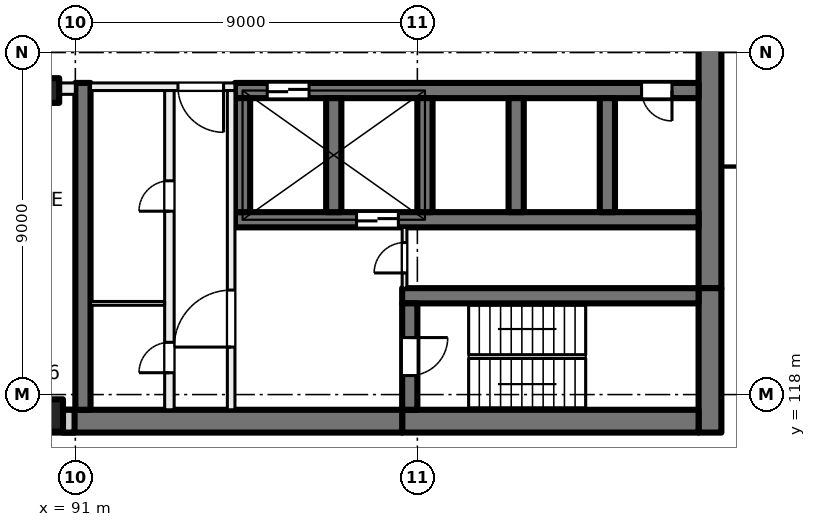
"""IFC4 building model, lengths in metres.
Left out: names, types, materials, properties, quantities, classifications, styles, units other than length and angle.
Written with IfcOpenShell. Run it as: python <this file> out.ifc"""

import sys

from ifc_helpers import new_model, si_unit, direction, frame, frame_2d, origin, origin_2d, place, context, subcontext, project, spatial, rectangle, extrude, element, fill, save


model = new_model("IFC4")
c1 = context("Model", 3, precision=1e-05, world=origin(), true_north=direction((0.0, 1.0)))
c2 = subcontext(c1, "Body", "Model", "MODEL_VIEW")
j1 = project(units=[si_unit("LENGTHUNIT", "METRE"), si_unit("PLANEANGLEUNIT", "RADIAN")], contexts=[c1])
p1 = place(None, origin())
s1 = spatial("IfcSite", under=j1, at=p1, CompositionType="ELEMENT")
p2 = place(p1, origin())
s2 = spatial("IfcBuilding", under=s1, at=p2, CompositionType="ELEMENT")
p3 = place(p2, frame((0.0, 0.0, 121.0)))
s3 = spatial("IfcBuildingStorey", under=s2, at=p3, CompositionType="ELEMENT", Elevation=121.0)
p4 = place(p3, frame((90.25, 126.0, 0.0), z_axis=(0.0, 0.0, 1.0), x_axis=(1.0, 0.0, 0.0)))
e1 = element("IfcColumn", 1, at=p4, inside=s3, PredefinedType="COLUMN", context=c2, shape_type="SweptSolid", body=[
    extrude(rectangle(XDim=0.65, YDim=0.65, at=origin_2d()), origin(), (0.0, 0.0, 1.0), 4.0),
])
p5 = place(p3, frame((90.25, 117.45, 0.0), z_axis=(0.0, 0.0, 1.0), x_axis=(1.0, 0.0, 0.0)))
e2 = element("IfcColumn", 2, at=p5, inside=s3, PredefinedType="COLUMN", context=c2, shape_type="SweptSolid", body=[
    extrude(rectangle(XDim=0.85, YDim=0.85, at=origin_2d()), origin(), (0.0, 0.0, 1.0), 4.0),
])
p6 = place(p3, frame((107.7, 135.2, 0.0), z_axis=(0.0, 0.0, 1.0), x_axis=(0.0, -1.0, 0.0)))
e3 = element("IfcWall", 3, at=p6, inside=s3, PredefinedType="SHEAR", context=c2, shape_type="SweptSolid", body=[
    extrude(rectangle(XDim=14.4, YDim=0.6, at=frame_2d((7.2, 0.0))), origin(), (0.0, 0.0, 1.0), 4.0),
])
p7 = place(p3, frame((107.7, 120.8, 0.0), z_axis=(0.0, 0.0, 1.0), x_axis=(0.0, -1.0, 0.0)))
e4 = element("IfcWall", 4, at=p7, inside=s3, PredefinedType="SHEAR", context=c2, shape_type="SweptSolid", body=[
    extrude(rectangle(XDim=3.8, YDim=0.6, at=frame_2d((1.9, 0.0))), origin(), (0.0, 0.0, 1.0), 4.0),
])
p8 = place(p3, frame((107.4, 117.3, 0.0), z_axis=(0.0, 0.0, 1.0), x_axis=(-1.0, 0.0, 0.0)))
e5 = element("IfcWall", 5, at=p8, inside=s3, PredefinedType="SHEAR", context=c2, shape_type="SweptSolid", body=[
    extrude(rectangle(XDim=7.8, YDim=0.6, at=frame_2d((3.9, 0.0))), origin(), (0.0, 0.0, 1.0), 4.0),
])
p9 = place(p3, frame((99.6, 117.3, 0.0), z_axis=(0.0, 0.0, 1.0), x_axis=(-1.0, 0.0, 0.0)))
e6 = element("IfcWall", 6, at=p9, inside=s3, PredefinedType="SHEAR", context=c2, shape_type="SweptSolid", body=[
    extrude(rectangle(XDim=8.925, YDim=0.6, at=frame_2d((4.462, 0.0))), origin(), (0.0, 0.0, 1.0), 4.0),
])
p10 = place(p3, frame((107.4, 120.6, 0.0), z_axis=(0.0, 0.0, 1.0), x_axis=(-1.0, 0.0, 0.0)))
e7 = element("IfcWall", 7, at=p10, inside=s3, PredefinedType="SHEAR", context=c2, shape_type="SweptSolid", body=[
    extrude(rectangle(XDim=7.8, YDim=0.4, at=frame_2d((3.9, 0.0))), origin(), (0.0, 0.0, 1.0), 4.0),
])
p11 = place(p3, frame((99.8, 120.4, 0.0), z_axis=(0.0, 0.0, 1.0), x_axis=(0.0, -1.0, 0.0)))
e8 = element("IfcWall", 8, at=p11, inside=s3, PredefinedType="SHEAR", context=c2, shape_type="SweptSolid", body=[
    extrude(rectangle(XDim=2.8, YDim=0.4, at=frame_2d((1.4, 0.0))), origin(), (0.0, 0.0, 1.0), 4.0),
])
p12 = place(p11, frame((0.9, 0.0, 0.0)))
e9 = element("IfcOpeningElement", 9, at=p12, cuts=e8, PredefinedType="OPENING", context=c2, shape_type="SweptSolid", body=[
    extrude(rectangle(XDim=1.0, YDim=2.1, at=frame_2d((0.5, 1.05))), frame((0.0, 0.21, 0.0), z_axis=(0.0, -1.0, 0.0), x_axis=(1.0, 0.0, 0.0)), (0.0, 0.0, 1.0), 0.42),
])
p13 = place(p3, frame((107.4, 126.0, 0.0), z_axis=(0.0, 0.0, 1.0), x_axis=(-1.0, 0.0, 0.0)))
e10 = element("IfcWall", 10, at=p13, inside=s3, PredefinedType="SHEAR", context=c2, shape_type="SweptSolid", body=[
    extrude(rectangle(XDim=12.2, YDim=0.4, at=frame_2d((6.1, 0.0))), origin(), (0.0, 0.0, 1.0), 4.0),
])
p14 = place(p13, frame((10.25, 0.0, 0.0)))
e11 = element("IfcOpeningElement", 11, at=p14, cuts=e10, PredefinedType="OPENING", context=c2, shape_type="SweptSolid", body=[
    extrude(rectangle(XDim=1.1, YDim=2.1, at=frame_2d((0.55, 1.05))), frame((0.0, 0.21, 0.0), z_axis=(0.0, -1.0, 0.0), x_axis=(1.0, 0.0, 0.0)), (0.0, 0.0, 1.0), 0.42),
])
p15 = place(p13, frame((0.7, 0.0, 0.0)))
e12 = element("IfcOpeningElement", 12, at=p15, cuts=e10, PredefinedType="OPENING", context=c2, shape_type="SweptSolid", body=[
    extrude(rectangle(XDim=0.8, YDim=2.1, at=frame_2d((0.4, 1.05))), frame((0.0, 0.21, 0.0), z_axis=(0.0, -1.0, 0.0), x_axis=(1.0, 0.0, 0.0)), (0.0, 0.0, 1.0), 0.42),
])
p16 = place(p3, frame((107.4, 122.6, 0.0), z_axis=(0.0, 0.0, 1.0), x_axis=(-1.0, 0.0, 0.0)))
e13 = element("IfcWall", 13, at=p16, inside=s3, PredefinedType="SHEAR", context=c2, shape_type="SweptSolid", body=[
    extrude(rectangle(XDim=12.2, YDim=0.4, at=frame_2d((6.1, 0.0))), origin(), (0.0, 0.0, 1.0), 4.0),
])
p17 = place(p16, frame((7.9, 0.0, 0.0)))
e14 = element("IfcOpeningElement", 14, at=p17, cuts=e13, PredefinedType="OPENING", context=c2, shape_type="SweptSolid", body=[
    extrude(rectangle(XDim=1.1, YDim=2.1, at=frame_2d((0.55, 1.05))), frame((0.0, 0.21, 0.0), z_axis=(0.0, -1.0, 0.0), x_axis=(1.0, 0.0, 0.0)), (0.0, 0.0, 1.0), 0.42),
])
for number, where, z_axis, x_axis in (
    (15, (105.0, 125.8, 0.0), (0.0, 0.0, 1.0), (0.0, -1.0, 0.0)),
    (16, (102.6, 125.8, 0.0), (0.0, 0.0, 1.0), (0.0, -1.0, 0.0)),
    (17, (100.2, 125.8, 0.0), (0.0, 0.0, 1.0), (0.0, -1.0, 0.0)),
    (18, (97.8, 125.8, 0.0), (0.0, 0.0, 1.0), (0.0, -1.0, 0.0)),
    (19, (95.4, 125.8, 0.0), (0.0, 0.0, 1.0), (0.0, -1.0, 0.0)),
):
    element("IfcWall", number, at=place(p3, frame(where, z_axis=z_axis, x_axis=x_axis)), inside=s3, PredefinedType="SHEAR", context=c2, shape_type="SweptSolid", body=[
        extrude(rectangle(XDim=3.0, YDim=0.4, at=frame_2d((1.5, 0.0))), origin(), (0.0, 0.0, 1.0), 4.0),
    ])
p18 = place(p3, frame((91.2, 126.2, 0.0), z_axis=(0.0, 0.0, 1.0), x_axis=(0.0, -1.0, 0.0)))
e20 = element("IfcWall", 20, at=p18, inside=s3, PredefinedType="SHEAR", context=c2, shape_type="SweptSolid", body=[
    extrude(rectangle(XDim=8.6, YDim=0.4, at=frame_2d((4.3, 0.0))), origin(), (0.0, 0.0, 1.0), 4.0),
])
p19 = place(p3, frame((90.98, 117.3, 0.0), z_axis=(0.0, 0.0, 1.0), x_axis=(-1.0, 0.0, 0.0)))
e21 = element("IfcWall", 21, at=p19, inside=s3, PredefinedType="SOLIDWALL", context=c2, shape_type="SweptSolid", body=[
    extrude(rectangle(XDim=33.745, YDim=0.6, at=frame_2d((16.873, 0.0))), origin(), (0.0, 0.0, 1.0), 3.625),
])
p20 = place(p19, frame((1.48, 0.0, 0.9)))
e22 = element("IfcOpeningElement", 22, at=p20, cuts=e21, PredefinedType="OPENING", context=c2, shape_type="SweptSolid", body=[
    extrude(rectangle(XDim=3.0, YDim=2.4, at=frame_2d((1.5, 1.2))), frame((0.0, 0.31, 0.0), z_axis=(0.0, -1.0, 0.0), x_axis=(1.0, 0.0, 0.0)), (0.0, 0.0, 1.0), 0.62),
])
p21 = place(p19, frame((5.98, 0.0, 0.9)))
e23 = element("IfcOpeningElement", 23, at=p21, cuts=e21, PredefinedType="OPENING", context=c2, shape_type="SweptSolid", body=[
    extrude(rectangle(XDim=3.0, YDim=2.4, at=frame_2d((1.5, 1.2))), frame((0.0, 0.31, 0.0), z_axis=(0.0, -1.0, 0.0), x_axis=(1.0, 0.0, 0.0)), (0.0, 0.0, 1.0), 0.62),
])
p22 = place(p19, frame((10.48, 0.0, 0.9)))
e24 = element("IfcOpeningElement", 24, at=p22, cuts=e21, PredefinedType="OPENING", context=c2, shape_type="SweptSolid", body=[
    extrude(rectangle(XDim=3.0, YDim=2.4, at=frame_2d((1.5, 1.2))), frame((0.0, 0.31, 0.0), z_axis=(0.0, -1.0, 0.0), x_axis=(1.0, 0.0, 0.0)), (0.0, 0.0, 1.0), 0.62),
])
p23 = place(p19, frame((14.98, 0.0, 0.9)))
e25 = element("IfcOpeningElement", 25, at=p23, cuts=e21, PredefinedType="OPENING", context=c2, shape_type="SweptSolid", body=[
    extrude(rectangle(XDim=3.0, YDim=2.4, at=frame_2d((1.5, 1.2))), frame((0.0, 0.31, 0.0), z_axis=(0.0, -1.0, 0.0), x_axis=(1.0, 0.0, 0.0)), (0.0, 0.0, 1.0), 0.62),
])
p24 = place(p19, frame((19.48, 0.0, 0.9)))
e26 = element("IfcOpeningElement", 26, at=p24, cuts=e21, PredefinedType="OPENING", context=c2, shape_type="SweptSolid", body=[
    extrude(rectangle(XDim=3.0, YDim=2.4, at=frame_2d((1.5, 1.2))), frame((0.0, 0.31, 0.0), z_axis=(0.0, -1.0, 0.0), x_axis=(1.0, 0.0, 0.0)), (0.0, 0.0, 1.0), 0.62),
])
p25 = place(p19, frame((23.98, 0.0, 0.9)))
e27 = element("IfcOpeningElement", 27, at=p25, cuts=e21, PredefinedType="OPENING", context=c2, shape_type="SweptSolid", body=[
    extrude(rectangle(XDim=3.0, YDim=2.4, at=frame_2d((1.5, 1.2))), frame((0.0, 0.31, 0.0), z_axis=(0.0, -1.0, 0.0), x_axis=(1.0, 0.0, 0.0)), (0.0, 0.0, 1.0), 0.62),
])
p26 = place(p19, frame((28.48, 0.0, 0.9)))
e28 = element("IfcOpeningElement", 28, at=p26, cuts=e21, PredefinedType="OPENING", context=c2, shape_type="SweptSolid", body=[
    extrude(rectangle(XDim=3.0, YDim=2.4, at=frame_2d((1.5, 1.2))), frame((0.0, 0.31, 0.0), z_axis=(0.0, -1.0, 0.0), x_axis=(1.0, 0.0, 0.0)), (0.0, 0.0, 1.0), 0.62),
])
p27 = place(p3, frame((95.2, 126.1, 0.0), z_axis=(0.0, 0.0, 1.0), x_axis=(-1.0, 0.0, 0.0)))
e29 = element("IfcWall", 29, at=p27, inside=s3, PredefinedType="PARTITIONING", context=c2, shape_type="SweptSolid", body=[
    extrude(rectangle(XDim=3.8, YDim=0.2, at=frame_2d((1.9, 0.0))), origin(), (0.0, 0.0, 1.0), 3.625),
])
p28 = place(p27, frame((0.3, 0.0, 0.0)))
e30 = element("IfcOpeningElement", 30, at=p28, cuts=e29, PredefinedType="OPENING", context=c2, shape_type="SweptSolid", body=[
    extrude(rectangle(XDim=1.2, YDim=2.1, at=frame_2d((0.6, 1.05))), frame((0.0, 0.11, 0.0), z_axis=(0.0, -1.0, 0.0), x_axis=(1.0, 0.0, 0.0)), (0.0, 0.0, 1.0), 0.22),
])
p29 = place(p3, frame((95.1, 117.6, 0.0), z_axis=(0.0, 0.0, 1.0), x_axis=(0.0, 1.0, 0.0)))
e31 = element("IfcWall", 31, at=p29, inside=s3, PredefinedType="PARTITIONING", context=c2, shape_type="SweptSolid", body=[
    extrude(rectangle(XDim=8.4, YDim=0.2, at=frame_2d((4.2, 0.0))), origin(), (0.0, 0.0, 1.0), 3.625),
])
p30 = place(p29, frame((1.65, 0.0, 0.0)))
e32 = element("IfcOpeningElement", 32, at=p30, cuts=e31, PredefinedType="OPENING", context=c2, shape_type="SweptSolid", body=[
    extrude(rectangle(XDim=1.5, YDim=2.1, at=frame_2d((0.75, 1.05))), frame((0.0, 0.11, 0.0), z_axis=(0.0, -1.0, 0.0), x_axis=(1.0, 0.0, 0.0)), (0.0, 0.0, 1.0), 0.22),
])
p31 = place(p3, frame((93.475, 117.6, 0.0), z_axis=(0.0, 0.0, 1.0), x_axis=(0.0, 1.0, 0.0)))
e33 = element("IfcWall", 33, at=p31, inside=s3, PredefinedType="PARTITIONING", context=c2, shape_type="SweptSolid", body=[
    extrude(rectangle(XDim=8.4, YDim=0.25, at=frame_2d((4.2, 0.0))), origin(), (0.0, 0.0, 1.0), 3.625),
])
p32 = place(p31, frame((5.225, 0.0, 0.0)))
e34 = element("IfcOpeningElement", 34, at=p32, cuts=e33, PredefinedType="OPENING", context=c2, shape_type="SweptSolid", body=[
    extrude(rectangle(XDim=0.8, YDim=2.1, at=frame_2d((0.4, 1.05))), frame((0.0, 0.135, 0.0), z_axis=(0.0, -1.0, 0.0), x_axis=(1.0, 0.0, 0.0)), (0.0, 0.0, 1.0), 0.27),
])
p33 = place(p31, frame((0.975, 0.0, 0.0)))
e35 = element("IfcOpeningElement", 35, at=p33, cuts=e33, PredefinedType="OPENING", context=c2, shape_type="SweptSolid", body=[
    extrude(rectangle(XDim=0.8, YDim=2.1, at=frame_2d((0.4, 1.05))), frame((0.0, 0.135, 0.0), z_axis=(0.0, -1.0, 0.0), x_axis=(1.0, 0.0, 0.0)), (0.0, 0.0, 1.0), 0.27),
])
p34 = place(p3, frame((99.663, 120.8, 0.0), z_axis=(0.0, 0.0, 1.0), x_axis=(0.0, 1.0, 0.0)))
e36 = element("IfcWall", 36, at=p34, inside=s3, PredefinedType="PARTITIONING", context=c2, shape_type="SweptSolid", body=[
    extrude(rectangle(XDim=1.6, YDim=0.125, at=frame_2d((0.8, 0.0))), origin(), (0.0, 0.0, 1.0), 3.625),
])
p35 = place(p34, frame((0.4, 0.0, 0.0)))
e37 = element("IfcOpeningElement", 37, at=p35, cuts=e36, PredefinedType="OPENING", context=c2, shape_type="SweptSolid", body=[
    extrude(rectangle(XDim=0.8, YDim=2.1, at=frame_2d((0.4, 1.05))), frame((0.0, 0.073, 0.0), z_axis=(0.0, -1.0, 0.0), x_axis=(1.0, 0.0, 0.0)), (0.0, 0.0, 1.0), 0.145),
])
p36 = place(p3, frame((93.35, 120.4, 0.0), z_axis=(0.0, 0.0, 1.0), x_axis=(-1.0, 0.0, 0.0)))
e38 = element("IfcWall", 38, at=p36, inside=s3, PredefinedType="PARTITIONING", context=c2, shape_type="SweptSolid", body=[
    extrude(rectangle(XDim=1.95, YDim=0.1, at=frame_2d((0.975, 0.0))), origin(), (0.0, 0.0, 1.0), 3.625),
])
p37 = place(p3, frame((91.0, 126.05, 0.0), z_axis=(0.0, 0.0, 1.0), x_axis=(-1.0, 0.0, 0.0)))
e39 = element("IfcWall", 39, at=p37, inside=s3, PredefinedType="PARTITIONING", context=c2, shape_type="SweptSolid", body=[
    extrude(rectangle(XDim=43.785, YDim=0.3, at=frame_2d((21.893, 0.0))), origin(), (0.0, 0.0, 1.0), 3.625),
])
p38 = place(p37, frame((7.475, 0.0, 0.0)))
e40 = element("IfcOpeningElement", 40, at=p38, cuts=e39, PredefinedType="OPENING", context=c2, shape_type="SweptSolid", body=[
    extrude(rectangle(XDim=1.8, YDim=2.1, at=frame_2d((0.9, 1.05))), frame((0.0, 0.16, 0.0), z_axis=(0.0, -1.0, 0.0), x_axis=(1.0, 0.0, 0.0)), (0.0, 0.0, 1.0), 0.32),
])
p39 = place(p37, frame((34.0, 0.0, 0.0)))
e41 = element("IfcOpeningElement", 41, at=p39, cuts=e39, PredefinedType="OPENING", context=c2, shape_type="SweptSolid", body=[
    extrude(rectangle(XDim=1.0, YDim=2.1, at=frame_2d((0.5, 1.05))), frame((0.0, 0.16, 0.0), z_axis=(0.0, -1.0, 0.0), x_axis=(1.0, 0.0, 0.0)), (0.0, 0.0, 1.0), 0.32),
])
p40 = place(p37, frame((39.296, 0.0, 0.0)))
e42 = element("IfcOpeningElement", 42, at=p40, cuts=e39, PredefinedType="OPENING", context=c2, shape_type="SweptSolid", body=[
    extrude(rectangle(XDim=1.8, YDim=2.1, at=frame_2d((0.9, 1.05))), frame((0.0, 0.16, 0.0), z_axis=(0.0, -1.0, 0.0), x_axis=(1.0, 0.0, 0.0)), (0.0, 0.0, 1.0), 0.32),
])
p41 = place(p14, origin())
e43 = element("IfcDoor", 43, at=p41, inside=s3, OperationType="DOUBLE_DOOR_SLIDING", PredefinedType="DOOR", context=c2, shape_type="SweptSolid", body=[
    extrude(rectangle(XDim=1.1, YDim=2.1, at=frame_2d((0.55, 1.05))), frame((0.0, 0.025, 0.0), z_axis=(0.0, -1.0, 0.0), x_axis=(1.0, 0.0, 0.0)), (0.0, 0.0, 1.0), 0.05),
])
fill(e11, e43)
p42 = place(p15, origin())
e44 = element("IfcDoor", 44, at=p42, inside=s3, OperationType="SINGLE_SWING_LEFT", PredefinedType="DOOR", context=c2, shape_type="SweptSolid", body=[
    extrude(rectangle(XDim=0.8, YDim=2.1, at=frame_2d((0.4, 1.05))), frame((0.0, 0.025, 0.0), z_axis=(0.0, -1.0, 0.0), x_axis=(1.0, 0.0, 0.0)), (0.0, 0.0, 1.0), 0.05),
])
fill(e12, e44)
p43 = place(p28, origin())
e45 = element("IfcDoor", 45, at=p43, inside=s3, OperationType="DOUBLE_DOOR_SINGLE_SWING", PredefinedType="DOOR", context=c2, shape_type="SweptSolid", body=[
    extrude(rectangle(XDim=1.2, YDim=2.1, at=frame_2d((0.6, 1.05))), frame((0.0, 0.025, 0.0), z_axis=(0.0, -1.0, 0.0), x_axis=(1.0, 0.0, 0.0)), (0.0, 0.0, 1.0), 0.05),
])
fill(e30, e45)
p44 = place(p30, origin())
e46 = element("IfcDoor", 46, at=p44, inside=s3, OperationType="DOUBLE_DOOR_SINGLE_SWING", PredefinedType="DOOR", context=c2, shape_type="SweptSolid", body=[
    extrude(rectangle(XDim=1.5, YDim=2.1, at=frame_2d((0.75, 1.05))), frame((0.0, 0.025, 0.0), z_axis=(0.0, -1.0, 0.0), x_axis=(1.0, 0.0, 0.0)), (0.0, 0.0, 1.0), 0.05),
])
fill(e32, e46)
p45 = place(p12, origin())
e47 = element("IfcDoor", 47, at=p45, inside=s3, OperationType="SINGLE_SWING_LEFT", PredefinedType="DOOR", context=c2, shape_type="SweptSolid", body=[
    extrude(rectangle(XDim=1.0, YDim=2.1, at=frame_2d((0.5, 1.05))), frame((0.0, 0.025, 0.0), z_axis=(0.0, -1.0, 0.0), x_axis=(1.0, 0.0, 0.0)), (0.0, 0.0, 1.0), 0.05),
])
fill(e9, e47)
p46 = place(p35, origin())
e48 = element("IfcDoor", 48, at=p46, inside=s3, OperationType="SINGLE_SWING_RIGHT", PredefinedType="DOOR", context=c2, shape_type="SweptSolid", body=[
    extrude(rectangle(XDim=0.8, YDim=2.1, at=frame_2d((0.4, 1.05))), frame((0.0, 0.025, 0.0), z_axis=(0.0, -1.0, 0.0), x_axis=(1.0, 0.0, 0.0)), (0.0, 0.0, 1.0), 0.05),
])
fill(e37, e48)
p47 = place(p32, origin())
e49 = element("IfcDoor", 49, at=p47, inside=s3, OperationType="SINGLE_SWING_LEFT", PredefinedType="DOOR", context=c2, shape_type="SweptSolid", body=[
    extrude(rectangle(XDim=0.8, YDim=2.1, at=frame_2d((0.4, 1.05))), frame((0.0, 0.025, 0.0), z_axis=(0.0, -1.0, 0.0), x_axis=(1.0, 0.0, 0.0)), (0.0, 0.0, 1.0), 0.05),
])
fill(e34, e49)
p48 = place(p33, origin())
e50 = element("IfcDoor", 50, at=p48, inside=s3, OperationType="SINGLE_SWING_RIGHT", PredefinedType="DOOR", context=c2, shape_type="SweptSolid", body=[
    extrude(rectangle(XDim=0.8, YDim=2.1, at=frame_2d((0.4, 1.05))), frame((0.0, 0.025, 0.0), z_axis=(0.0, -1.0, 0.0), x_axis=(1.0, 0.0, 0.0)), (0.0, 0.0, 1.0), 0.05),
])
fill(e35, e50)
p49 = place(p17, origin())
e51 = element("IfcDoor", 51, at=p49, inside=s3, OperationType="DOUBLE_DOOR_SLIDING", PredefinedType="DOOR", context=c2, shape_type="SweptSolid", body=[
    extrude(rectangle(XDim=1.1, YDim=2.1, at=frame_2d((0.55, 1.05))), frame((0.0, 0.025, 0.0), z_axis=(0.0, -1.0, 0.0), x_axis=(1.0, 0.0, 0.0)), (0.0, 0.0, 1.0), 0.05),
])
fill(e14, e51)
save(model, sys.argv[1])
